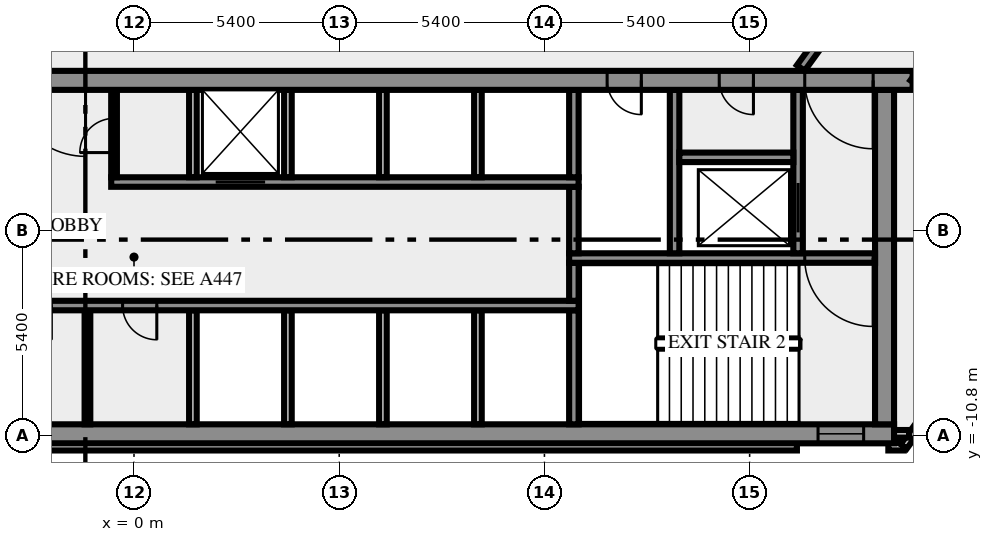
"""IFC4 building model, lengths in metres.
Left out: names, types, materials, properties, quantities, classifications, styles, units other than length and angle.
Written with IfcOpenShell. Run it as: python <this file> out.ifc"""

import sys

from ifc_helpers import new_model, si_unit, direction, frame, frame_2d, origin, place, context, subcontext, project, spatial, rectangle, extrude, element, fill, save


model = new_model("IFC4")
c1 = context("Model", 3, precision=1e-05, world=origin(), true_north=direction((0.0, 1.0)))
c2 = subcontext(c1, "Body", "Model", "MODEL_VIEW")
j1 = project(units=[si_unit("LENGTHUNIT", "METRE"), si_unit("PLANEANGLEUNIT", "RADIAN")], contexts=[c1])
p1 = place(None, origin())
s1 = spatial("IfcSite", under=j1, at=p1, CompositionType="ELEMENT")
p2 = place(p1, origin())
s2 = spatial("IfcBuilding", under=s1, at=p2, CompositionType="ELEMENT")
p3 = place(p2, frame((0.0, 0.0, 11.5)))
s3 = spatial("IfcBuildingStorey", under=s2, at=p3, CompositionType="ELEMENT", Elevation=11.5)
p4 = place(p3, frame((-17.444, -11.088, 0.0), z_axis=(0.0, 0.0, 1.0), x_axis=(1.0, 0.0, 0.0)))
e1 = element("IfcWall", 1, at=p4, inside=s3, PredefinedType="SOLIDWALL", context=c2, shape_type="SweptSolid", body=[
    extrude(rectangle(XDim=34.888, YDim=0.2, at=frame_2d((17.444, 0.0))), origin(), (0.0, 0.0, 1.0), 4.1),
])
p5 = place(p3, frame((19.85, -11.088, 0.0), z_axis=(0.0, 0.0, 1.0), x_axis=(1.0, 0.0, 0.0)))
e2 = element("IfcWall", 2, at=p5, inside=s3, PredefinedType="SOLIDWALL", context=c2, shape_type="SweptSolid", body=[
    extrude(rectangle(XDim=0.406, YDim=0.2, at=frame_2d((0.203, 0.0))), origin(), (0.0, 0.0, 1.0), 4.1),
])
p6 = place(p3, frame((20.253, -11.083, 0.0), z_axis=(0.0, 0.0, 1.0), x_axis=(0.587766567315, 0.809030569476, 0.0)))
e3 = element("IfcWall", 3, at=p6, inside=s3, PredefinedType="SOLIDWALL", context=c2, shape_type="SweptSolid", body=[
    extrude(rectangle(XDim=2.688, YDim=0.2, at=frame_2d((1.344, 0.0))), origin(), (0.0, 0.0, 1.0), 4.1),
])
p7 = place(p3, frame((19.98, -10.75, 0.0), z_axis=(0.0, 0.0, 1.0), x_axis=(1.0, 0.0, 0.0)))
e4 = element("IfcWall", 4, at=p7, inside=s3, PredefinedType="SOLIDWALL", context=c2, shape_type="SweptSolid", body=[
    extrude(rectangle(XDim=0.417, YDim=0.2, at=frame_2d((0.208, 0.0))), origin(), (0.0, 0.0, 1.0), 4.1),
])
p8 = place(p3, frame((-20.0, -10.75, 0.0), z_axis=(0.0, 0.0, 1.0), x_axis=(1.0, 0.0, 0.0)))
e5 = element("IfcWall", 5, at=p8, inside=s3, PredefinedType="SHEAR", context=c2, shape_type="SweptSolid", body=[
    extrude(rectangle(XDim=40.0, YDim=0.5, at=frame_2d((20.0, 0.0))), origin(), (0.0, 0.0, 1.0), 4.1),
])
p9 = place(p8, frame((0.8, 0.0, 1.0)))
e6 = element("IfcOpeningElement", 6, at=p9, cuts=e5, PredefinedType="OPENING", context=c2, shape_type="SweptSolid", body=[
    extrude(rectangle(XDim=1.2, YDim=1.2, at=frame_2d((0.6, 0.6))), frame((0.0, 0.26, 0.0), z_axis=(0.0, -1.0, 0.0), x_axis=(1.0, 0.0, 0.0)), (0.0, 0.0, 1.0), 0.52),
])
p10 = place(p8, frame((38.0, 0.0, 1.0)))
e7 = element("IfcOpeningElement", 7, at=p10, cuts=e5, PredefinedType="OPENING", context=c2, shape_type="SweptSolid", body=[
    extrude(rectangle(XDim=1.2, YDim=1.2, at=frame_2d((0.6, 0.6))), frame((0.0, 0.26, 0.0), z_axis=(0.0, -1.0, 0.0), x_axis=(1.0, 0.0, 0.0)), (0.0, 0.0, 1.0), 0.52),
])
p11 = place(p3, frame((-1.225, -10.5, 0.0), z_axis=(0.0, 0.0, 1.0), x_axis=(0.0, 1.0, 0.0)))
e8 = element("IfcWall", 8, at=p11, inside=s3, PredefinedType="PARTITIONING", context=c2, shape_type="SweptSolid", body=[
    extrude(rectangle(XDim=3.0, YDim=0.15, at=frame_2d((1.5, 0.0))), origin(), (0.0, 0.0, 1.0), 4.1),
])
for number, where, z_axis, x_axis in (
    (9, (1.55, -10.5, 0.0), (0.0, 0.0, 1.0), (0.0, 1.0, 0.0)),
    (10, (4.05, -10.5, 0.0), (0.0, 0.0, 1.0), (0.0, 1.0, 0.0)),
    (11, (6.55, -10.5, 0.0), (0.0, 0.0, 1.0), (0.0, 1.0, 0.0)),
    (12, (9.05, -10.5, 0.0), (0.0, 0.0, 1.0), (0.0, 1.0, 0.0)),
):
    element("IfcWall", number, at=place(p3, frame(where, z_axis=z_axis, x_axis=x_axis)), inside=s3, PredefinedType="SOLIDWALL", context=c2, shape_type="SweptSolid", body=[
        extrude(rectangle(XDim=3.0, YDim=0.2, at=frame_2d((1.5, 0.0))), origin(), (0.0, 0.0, 1.0), 4.1),
    ])
p12 = place(p3, frame((11.575, -10.5, 0.0), z_axis=(0.0, 0.0, 1.0), x_axis=(0.0, 1.0, 0.0)))
e13 = element("IfcWall", 13, at=p12, inside=s3, PredefinedType="SHEAR", context=c2, shape_type="SweptSolid", body=[
    extrude(rectangle(XDim=3.0, YDim=0.25, at=frame_2d((1.5, 0.0))), origin(), (0.0, 0.0, 1.0), 4.1),
])
p13 = place(p3, frame((19.75, -10.5, 0.0), z_axis=(0.0, 0.0, 1.0), x_axis=(0.0, 1.0, 0.0)))
e14 = element("IfcWall", 14, at=p13, inside=s3, PredefinedType="SHEAR", context=c2, shape_type="SweptSolid", body=[
    extrude(rectangle(XDim=8.8, YDim=0.5, at=frame_2d((4.4, 0.0))), origin(), (0.0, 0.0, 1.0), 4.1),
])
p14 = place(p3, frame((11.7, -7.375, 0.0), z_axis=(0.0, 0.0, 1.0), x_axis=(-1.0, 0.0, 0.0)))
e15 = element("IfcWall", 15, at=p14, inside=s3, PredefinedType="SHEAR", context=c2, shape_type="SweptSolid", body=[
    extrude(rectangle(XDim=23.4, YDim=0.25, at=frame_2d((11.7, 0.0))), origin(), (0.0, 0.0, 1.0), 4.1),
])
p15 = place(p14, frame((21.45, 0.0, 0.0)))
e16 = element("IfcOpeningElement", 16, at=p15, cuts=e15, PredefinedType="OPENING", context=c2, shape_type="SweptSolid", body=[
    extrude(rectangle(XDim=1.1, YDim=2.1, at=frame_2d((0.55, 1.05))), frame((0.0, 0.135, 0.0), z_axis=(0.0, -1.0, 0.0), x_axis=(1.0, 0.0, 0.0)), (0.0, 0.0, 1.0), 0.27),
])
p16 = place(p14, frame((18.95, 0.0, 0.0)))
e17 = element("IfcOpeningElement", 17, at=p16, cuts=e15, PredefinedType="OPENING", context=c2, shape_type="SweptSolid", body=[
    extrude(rectangle(XDim=1.1, YDim=2.1, at=frame_2d((0.55, 1.05))), frame((0.0, 0.135, 0.0), z_axis=(0.0, -1.0, 0.0), x_axis=(1.0, 0.0, 0.0)), (0.0, 0.0, 1.0), 0.27),
])
p17 = place(p14, frame((16.45, 0.0, 0.0)))
e18 = element("IfcOpeningElement", 18, at=p17, cuts=e15, PredefinedType="OPENING", context=c2, shape_type="SweptSolid", body=[
    extrude(rectangle(XDim=1.1, YDim=2.1, at=frame_2d((0.55, 1.05))), frame((0.0, 0.135, 0.0), z_axis=(0.0, -1.0, 0.0), x_axis=(1.0, 0.0, 0.0)), (0.0, 0.0, 1.0), 0.27),
])
p18 = place(p14, frame((13.875, 0.0, 0.0)))
e19 = element("IfcOpeningElement", 19, at=p18, cuts=e15, PredefinedType="OPENING", context=c2, shape_type="SweptSolid", body=[
    extrude(rectangle(XDim=0.9, YDim=2.1, at=frame_2d((0.45, 1.05))), frame((0.0, 0.135, 0.0), z_axis=(0.0, -1.0, 0.0), x_axis=(1.0, 0.0, 0.0)), (0.0, 0.0, 1.0), 0.27),
])
p19 = place(p14, frame((11.1, 0.0, 0.0)))
e20 = element("IfcOpeningElement", 20, at=p19, cuts=e15, PredefinedType="OPENING", context=c2, shape_type="SweptSolid", body=[
    extrude(rectangle(XDim=0.9, YDim=2.1, at=frame_2d((0.45, 1.05))), frame((0.0, 0.135, 0.0), z_axis=(0.0, -1.0, 0.0), x_axis=(1.0, 0.0, 0.0)), (0.0, 0.0, 1.0), 0.27),
])
p20 = place(p3, frame((11.575, -7.25, 0.0), z_axis=(0.0, 0.0, 1.0), x_axis=(0.0, 1.0, 0.0)))
e21 = element("IfcWall", 21, at=p20, inside=s3, PredefinedType="SHEAR", context=c2, shape_type="SweptSolid", body=[
    extrude(rectangle(XDim=1.0, YDim=0.25, at=frame_2d((0.5, 0.0))), origin(), (0.0, 0.0, 1.0), 4.1),
])
p21 = place(p3, frame((19.5, -6.125, 0.0), z_axis=(0.0, 0.0, 1.0), x_axis=(-1.0, 0.0, 0.0)))
e22 = element("IfcWall", 22, at=p21, inside=s3, PredefinedType="SHEAR", context=c2, shape_type="SweptSolid", body=[
    extrude(rectangle(XDim=8.05, YDim=0.25, at=frame_2d((4.025, 0.0))), origin(), (0.0, 0.0, 1.0), 4.1),
])
p22 = place(p21, frame((0.05, 0.0, 0.0)))
e23 = element("IfcOpeningElement", 23, at=p22, cuts=e22, PredefinedType="OPENING", context=c2, shape_type="SweptSolid", body=[
    extrude(rectangle(XDim=1.8, YDim=2.1, at=frame_2d((0.9, 1.05))), frame((0.0, 0.135, 0.0), z_axis=(0.0, -1.0, 0.0), x_axis=(1.0, 0.0, 0.0)), (0.0, 0.0, 1.0), 0.27),
])
p23 = place(p3, frame((11.575, -6.0, 0.0), z_axis=(0.0, 0.0, 1.0), x_axis=(0.0, 1.0, 0.0)))
e24 = element("IfcWall", 24, at=p23, inside=s3, PredefinedType="SHEAR", context=c2, shape_type="SweptSolid", body=[
    extrude(rectangle(XDim=1.75, YDim=0.25, at=frame_2d((0.875, 0.0))), origin(), (0.0, 0.0, 1.0), 4.1),
])
p24 = place(p3, frame((14.225, -6.0, 0.0), z_axis=(0.0, 0.0, 1.0), x_axis=(0.0, 1.0, 0.0)))
e25 = element("IfcWall", 25, at=p24, inside=s3, PredefinedType="SHEAR", context=c2, shape_type="SweptSolid", body=[
    extrude(rectangle(XDim=4.3, YDim=0.25, at=frame_2d((2.15, 0.0))), origin(), (0.0, 0.0, 1.0), 4.1),
])
p25 = place(p3, frame((17.475, -6.0, 0.0), z_axis=(0.0, 0.0, 1.0), x_axis=(0.0, 1.0, 0.0)))
e26 = element("IfcWall", 26, at=p25, inside=s3, PredefinedType="SHEAR", context=c2, shape_type="SweptSolid", body=[
    extrude(rectangle(XDim=4.3, YDim=0.25, at=frame_2d((2.15, 0.0))), origin(), (0.0, 0.0, 1.0), 4.1),
])
p26 = place(p25, frame((0.55, 0.0, 0.0)))
e27 = element("IfcOpeningElement", 27, at=p26, cuts=e26, PredefinedType="OPENING", context=c2, shape_type="SweptSolid", body=[
    extrude(rectangle(XDim=1.3, YDim=2.1, at=frame_2d((0.65, 1.05))), frame((0.0, 0.135, 0.0), z_axis=(0.0, -1.0, 0.0), x_axis=(1.0, 0.0, 0.0)), (0.0, 0.0, 1.0), 0.27),
])
p27 = place(p3, frame((-0.6, -4.125, 0.0), z_axis=(0.0, 0.0, 1.0), x_axis=(1.0, 0.0, 0.0)))
e28 = element("IfcWall", 28, at=p27, inside=s3, PredefinedType="SHEAR", context=c2, shape_type="SweptSolid", body=[
    extrude(rectangle(XDim=12.3, YDim=0.25, at=frame_2d((6.15, 0.0))), origin(), (0.0, 0.0, 1.0), 4.1),
])
p28 = place(p27, frame((2.75, 0.0, 0.0)))
e29 = element("IfcOpeningElement", 29, at=p28, cuts=e28, PredefinedType="OPENING", context=c2, shape_type="SweptSolid", body=[
    extrude(rectangle(XDim=1.3, YDim=2.1, at=frame_2d((0.65, 1.05))), frame((0.0, 0.135, 0.0), z_axis=(0.0, -1.0, 0.0), x_axis=(1.0, 0.0, 0.0)), (0.0, 0.0, 1.0), 0.27),
])
p29 = place(p3, frame((-0.525, -4.0, 0.0), z_axis=(0.0, 0.0, 1.0), x_axis=(0.0, 1.0, 0.0)))
e30 = element("IfcWall", 30, at=p29, inside=s3, PredefinedType="PARTITIONING", context=c2, shape_type="SweptSolid", body=[
    extrude(rectangle(XDim=2.3, YDim=0.15, at=frame_2d((1.15, 0.0))), origin(), (0.0, 0.0, 1.0), 4.1),
])
p30 = place(p29, frame((0.65, 0.0, 0.0)))
e31 = element("IfcOpeningElement", 31, at=p30, cuts=e30, PredefinedType="OPENING", context=c2, shape_type="SweptSolid", body=[
    extrude(rectangle(XDim=0.9, YDim=2.1, at=frame_2d((0.45, 1.05))), frame((0.0, 0.085, 0.0), z_axis=(0.0, -1.0, 0.0), x_axis=(1.0, 0.0, 0.0)), (0.0, 0.0, 1.0), 0.17),
])
for number, where, z_axis, x_axis in (
    (32, (1.55, -4.0, 0.0), (0.0, 0.0, 1.0), (0.0, 1.0, 0.0)),
    (33, (4.05, -4.0, 0.0), (0.0, 0.0, 1.0), (0.0, 1.0, 0.0)),
    (34, (6.55, -4.0, 0.0), (0.0, 0.0, 1.0), (0.0, 1.0, 0.0)),
    (35, (9.05, -4.0, 0.0), (0.0, 0.0, 1.0), (0.0, 1.0, 0.0)),
):
    element("IfcWall", number, at=place(p3, frame(where, z_axis=z_axis, x_axis=x_axis)), inside=s3, PredefinedType="SOLIDWALL", context=c2, shape_type="SweptSolid", body=[
        extrude(rectangle(XDim=2.3, YDim=0.2, at=frame_2d((1.15, 0.0))), origin(), (0.0, 0.0, 1.0), 4.1),
    ])
p31 = place(p3, frame((11.575, -4.0, 0.0), z_axis=(0.0, 0.0, 1.0), x_axis=(0.0, 1.0, 0.0)))
e36 = element("IfcWall", 36, at=p31, inside=s3, PredefinedType="SHEAR", context=c2, shape_type="SweptSolid", body=[
    extrude(rectangle(XDim=2.3, YDim=0.25, at=frame_2d((1.15, 0.0))), origin(), (0.0, 0.0, 1.0), 4.1),
])
p32 = place(p3, frame((14.35, -3.475, 0.0), z_axis=(0.0, 0.0, 1.0), x_axis=(1.0, 0.0, 0.0)))
e37 = element("IfcWall", 37, at=p32, inside=s3, PredefinedType="SHEAR", context=c2, shape_type="SweptSolid", body=[
    extrude(rectangle(XDim=3.0, YDim=0.25, at=frame_2d((1.5, 0.0))), origin(), (0.0, 0.0, 1.0), 4.1),
])
p33 = place(p3, frame((20.49, -1.45, 0.0), z_axis=(0.0, 0.0, 1.0), x_axis=(-1.0, 0.0, 0.0)))
e38 = element("IfcWall", 38, at=p33, inside=s3, PredefinedType="SHEAR", context=c2, shape_type="SweptSolid", body=[
    extrude(rectangle(XDim=40.98, YDim=0.5, at=frame_2d((20.49, 0.0))), origin(), (0.0, 0.0, 1.0), 4.1),
])
p34 = place(p33, frame((38.14, 0.0, 0.0)))
e39 = element("IfcOpeningElement", 39, at=p34, cuts=e38, PredefinedType="OPENING", context=c2, shape_type="SweptSolid", body=[
    extrude(rectangle(XDim=1.8, YDim=2.1, at=frame_2d((0.9, 1.05))), frame((0.0, 0.26, 0.0), z_axis=(0.0, -1.0, 0.0), x_axis=(1.0, 0.0, 0.0)), (0.0, 0.0, 1.0), 0.52),
])
p35 = place(p33, frame((36.728, 0.0, 0.0)))
e40 = element("IfcOpeningElement", 40, at=p35, cuts=e38, PredefinedType="OPENING", context=c2, shape_type="SweptSolid", body=[
    extrude(rectangle(XDim=0.8, YDim=2.1, at=frame_2d((0.4, 1.05))), frame((0.0, 0.26, 0.0), z_axis=(0.0, -1.0, 0.0), x_axis=(1.0, 0.0, 0.0)), (0.0, 0.0, 1.0), 0.52),
])
p36 = place(p33, frame((35.153, 0.0, 0.0)))
e41 = element("IfcOpeningElement", 41, at=p36, cuts=e38, PredefinedType="OPENING", context=c2, shape_type="SweptSolid", body=[
    extrude(rectangle(XDim=0.8, YDim=2.1, at=frame_2d((0.4, 1.05))), frame((0.0, 0.26, 0.0), z_axis=(0.0, -1.0, 0.0), x_axis=(1.0, 0.0, 0.0)), (0.0, 0.0, 1.0), 0.52),
])
p37 = place(p33, frame((32.94, 0.0, 0.0)))
e42 = element("IfcOpeningElement", 42, at=p37, cuts=e38, PredefinedType="OPENING", context=c2, shape_type="SweptSolid", body=[
    extrude(rectangle(XDim=0.9, YDim=2.1, at=frame_2d((0.45, 1.05))), frame((0.0, 0.26, 0.0), z_axis=(0.0, -1.0, 0.0), x_axis=(1.0, 0.0, 0.0)), (0.0, 0.0, 1.0), 0.52),
])
p38 = place(p33, frame((21.765, 0.0, 0.0)))
e43 = element("IfcOpeningElement", 43, at=p38, cuts=e38, PredefinedType="OPENING", context=c2, shape_type="SweptSolid", body=[
    extrude(rectangle(XDim=2.0, YDim=2.1, at=frame_2d((1.0, 1.05))), frame((0.0, 0.26, 0.0), z_axis=(0.0, -1.0, 0.0), x_axis=(1.0, 0.0, 0.0)), (0.0, 0.0, 1.0), 0.52),
])
p39 = place(p33, frame((7.14, 0.0, 0.0)))
e44 = element("IfcOpeningElement", 44, at=p39, cuts=e38, PredefinedType="OPENING", context=c2, shape_type="SweptSolid", body=[
    extrude(rectangle(XDim=0.9, YDim=2.1, at=frame_2d((0.45, 1.05))), frame((0.0, 0.26, 0.0), z_axis=(0.0, -1.0, 0.0), x_axis=(1.0, 0.0, 0.0)), (0.0, 0.0, 1.0), 0.52),
])
p40 = place(p33, frame((4.19, 0.0, 0.0)))
e45 = element("IfcOpeningElement", 45, at=p40, cuts=e38, PredefinedType="OPENING", context=c2, shape_type="SweptSolid", body=[
    extrude(rectangle(XDim=0.9, YDim=2.1, at=frame_2d((0.45, 1.05))), frame((0.0, 0.26, 0.0), z_axis=(0.0, -1.0, 0.0), x_axis=(1.0, 0.0, 0.0)), (0.0, 0.0, 1.0), 0.52),
])
p41 = place(p33, frame((1.04, 0.0, 0.0)))
e46 = element("IfcOpeningElement", 46, at=p41, cuts=e38, PredefinedType="OPENING", context=c2, shape_type="SweptSolid", body=[
    extrude(rectangle(XDim=1.8, YDim=2.1, at=frame_2d((0.9, 1.05))), frame((0.0, 0.26, 0.0), z_axis=(0.0, -1.0, 0.0), x_axis=(1.0, 0.0, 0.0)), (0.0, 0.0, 1.0), 0.52),
])
p42 = place(p3, frame((49.869, 38.856, 0.0), z_axis=(0.0, 0.0, 1.0), x_axis=(-0.587784522481, -0.809017524614, 0.0)))
e47 = element("IfcWall", 47, at=p42, inside=s3, PredefinedType="SOLIDWALL", context=c2, shape_type="SweptSolid", body=[
    extrude(rectangle(XDim=49.912, YDim=0.25, at=frame_2d((24.956, 0.0))), origin(), (0.0, 0.0, 1.0), 4.1),
])
p43 = place(p42, frame((23.897, 0.0, 0.0)))
e48 = element("IfcOpeningElement", 48, at=p43, cuts=e47, PredefinedType="OPENING", context=c2, shape_type="SweptSolid", body=[
    extrude(rectangle(XDim=0.9, YDim=2.1, at=frame_2d((0.45, 1.05))), frame((0.0, 0.135, 0.0), z_axis=(0.0, -1.0, 0.0), x_axis=(1.0, 0.0, 0.0)), (0.0, 0.0, 1.0), 0.27),
])
p44 = place(p42, frame((14.196, 0.0, 0.0)))
e49 = element("IfcOpeningElement", 49, at=p44, cuts=e47, PredefinedType="OPENING", context=c2, shape_type="SweptSolid", body=[
    extrude(rectangle(XDim=0.9, YDim=2.1, at=frame_2d((0.45, 1.05))), frame((0.0, 0.135, 0.0), z_axis=(0.0, -1.0, 0.0), x_axis=(1.0, 0.0, 0.0)), (0.0, 0.0, 1.0), 0.27),
])
p45 = place(p42, frame((39.847, 0.0, 0.0)))
e50 = element("IfcOpeningElement", 50, at=p45, cuts=e47, PredefinedType="OPENING", context=c2, shape_type="SweptSolid", body=[
    extrude(rectangle(XDim=0.9, YDim=2.1, at=frame_2d((0.45, 1.05))), frame((0.0, 0.135, 0.0), z_axis=(0.0, -1.0, 0.0), x_axis=(1.0, 0.0, 0.0)), (0.0, 0.0, 1.0), 0.27),
])
p46 = place(p42, frame((41.446, 0.0, 0.0)))
e51 = element("IfcOpeningElement", 51, at=p46, cuts=e47, PredefinedType="OPENING", context=c2, shape_type="SweptSolid", body=[
    extrude(rectangle(XDim=0.9, YDim=2.1, at=frame_2d((0.45, 1.05))), frame((0.0, 0.135, 0.0), z_axis=(0.0, -1.0, 0.0), x_axis=(1.0, 0.0, 0.0)), (0.0, 0.0, 1.0), 0.27),
])
p47 = place(p42, frame((31.997, 0.0, 0.0)))
e52 = element("IfcOpeningElement", 52, at=p47, cuts=e47, PredefinedType="OPENING", context=c2, shape_type="SweptSolid", body=[
    extrude(rectangle(XDim=0.9, YDim=2.1, at=frame_2d((0.45, 1.05))), frame((0.0, 0.135, 0.0), z_axis=(0.0, -1.0, 0.0), x_axis=(1.0, 0.0, 0.0)), (0.0, 0.0, 1.0), 0.27),
])
p48 = place(p42, frame((22.296, 0.0, 0.0)))
e53 = element("IfcOpeningElement", 53, at=p48, cuts=e47, PredefinedType="OPENING", context=c2, shape_type="SweptSolid", body=[
    extrude(rectangle(XDim=0.9, YDim=2.1, at=frame_2d((0.45, 1.05))), frame((0.0, 0.135, 0.0), z_axis=(0.0, -1.0, 0.0), x_axis=(1.0, 0.0, 0.0)), (0.0, 0.0, 1.0), 0.27),
])
p49 = place(p3, frame((17.545, -1.125, 0.0), z_axis=(0.0, 0.0, 1.0), x_axis=(0.587786323093, 0.809016216391, 0.0)))
e54 = element("IfcWall", 54, at=p49, inside=s3, PredefinedType="SOLIDWALL", context=c2, shape_type="SweptSolid", body=[
    extrude(rectangle(XDim=33.493, YDim=0.25, at=frame_2d((16.747, 0.0))), origin(), (0.0, 0.0, 1.0), 4.1),
])
p50 = place(p49, frame((3.441, 0.0, 0.0)))
e55 = element("IfcOpeningElement", 55, at=p50, cuts=e54, PredefinedType="OPENING", context=c2, shape_type="SweptSolid", body=[
    extrude(rectangle(XDim=0.9, YDim=2.1, at=frame_2d((0.45, 1.05))), frame((0.0, 0.135, 0.0), z_axis=(0.0, -1.0, 0.0), x_axis=(1.0, 0.0, 0.0)), (0.0, 0.0, 1.0), 0.27),
])
p51 = place(p49, frame((26.58, 0.0, 0.0)))
e56 = element("IfcOpeningElement", 56, at=p51, cuts=e54, PredefinedType="OPENING", context=c2, shape_type="SweptSolid", body=[
    extrude(rectangle(XDim=1.8, YDim=2.1, at=frame_2d((0.9, 1.05))), frame((0.0, 0.135, 0.0), z_axis=(0.0, -1.0, 0.0), x_axis=(1.0, 0.0, 0.0)), (0.0, 0.0, 1.0), 0.27),
])
p52 = place(p10, origin())
e57 = element("IfcWindow", 57, at=p52, inside=s3, PartitioningType="SINGLE_PANEL", PredefinedType="WINDOW", context=c2, shape_type="SweptSolid", body=[
    extrude(rectangle(XDim=1.2, YDim=1.2, at=frame_2d((0.6, 0.6))), frame((0.0, 0.03, 0.0), z_axis=(0.0, -1.0, 0.0), x_axis=(1.0, 0.0, 0.0)), (0.0, 0.0, 1.0), 0.06),
])
fill(e7, e57)
p53 = place(p19, origin())
e58 = element("IfcDoor", 58, at=p53, inside=s3, OperationType="SINGLE_SWING_LEFT", PredefinedType="DOOR", context=c2, shape_type="SweptSolid", body=[
    extrude(rectangle(XDim=0.9, YDim=2.1, at=frame_2d((0.45, 1.05))), frame((0.0, 0.025, 0.0), z_axis=(0.0, -1.0, 0.0), x_axis=(1.0, 0.0, 0.0)), (0.0, 0.0, 1.0), 0.05),
])
fill(e20, e58)
p54 = place(p22, origin())
e59 = element("IfcDoor", 59, at=p54, inside=s3, OperationType="DOUBLE_DOOR_SINGLE_SWING", PredefinedType="DOOR", context=c2, shape_type="SweptSolid", body=[
    extrude(rectangle(XDim=1.8, YDim=2.1, at=frame_2d((0.9, 1.05))), frame((0.0, 0.025, 0.0), z_axis=(0.0, -1.0, 0.0), x_axis=(1.0, 0.0, 0.0)), (0.0, 0.0, 1.0), 0.05),
])
fill(e23, e59)
p55 = place(p26, origin())
e60 = element("IfcDoor", 60, at=p55, inside=s3, OperationType="DOUBLE_DOOR_SLIDING", PredefinedType="DOOR", context=c2, shape_type="SweptSolid", body=[
    extrude(rectangle(XDim=1.3, YDim=2.1, at=frame_2d((0.65, 1.05))), frame((0.0, 0.025, 0.0), z_axis=(0.0, -1.0, 0.0), x_axis=(1.0, 0.0, 0.0)), (0.0, 0.0, 1.0), 0.05),
])
fill(e27, e60)
p56 = place(p28, origin())
e61 = element("IfcDoor", 61, at=p56, inside=s3, OperationType="DOUBLE_DOOR_SLIDING", PredefinedType="DOOR", context=c2, shape_type="SweptSolid", body=[
    extrude(rectangle(XDim=1.3, YDim=2.1, at=frame_2d((0.65, 1.05))), frame((0.0, 0.025, 0.0), z_axis=(0.0, -1.0, 0.0), x_axis=(1.0, 0.0, 0.0)), (0.0, 0.0, 1.0), 0.05),
])
fill(e29, e61)
p57 = place(p30, origin())
e62 = element("IfcDoor", 62, at=p57, inside=s3, OperationType="SINGLE_SWING_LEFT", PredefinedType="DOOR", context=c2, shape_type="SweptSolid", body=[
    extrude(rectangle(XDim=0.9, YDim=2.1, at=frame_2d((0.45, 1.05))), frame((0.0, 0.025, 0.0), z_axis=(0.0, -1.0, 0.0), x_axis=(1.0, 0.0, 0.0)), (0.0, 0.0, 1.0), 0.05),
])
fill(e31, e62)
p58 = place(p38, origin())
e63 = element("IfcDoor", 63, at=p58, inside=s3, OperationType="DOUBLE_DOOR_SINGLE_SWING", PredefinedType="DOOR", context=c2, shape_type="SweptSolid", body=[
    extrude(rectangle(XDim=2.0, YDim=2.1, at=frame_2d((1.0, 1.05))), frame((0.0, 0.025, 0.0), z_axis=(0.0, -1.0, 0.0), x_axis=(1.0, 0.0, 0.0)), (0.0, 0.0, 1.0), 0.05),
])
fill(e43, e63)
p59 = place(p39, origin())
e64 = element("IfcDoor", 64, at=p59, inside=s3, OperationType="SINGLE_SWING_LEFT", PredefinedType="DOOR", context=c2, shape_type="SweptSolid", body=[
    extrude(rectangle(XDim=0.9, YDim=2.1, at=frame_2d((0.45, 1.05))), frame((0.0, 0.025, 0.0), z_axis=(0.0, -1.0, 0.0), x_axis=(1.0, 0.0, 0.0)), (0.0, 0.0, 1.0), 0.05),
])
fill(e44, e64)
p60 = place(p40, origin())
e65 = element("IfcDoor", 65, at=p60, inside=s3, OperationType="SINGLE_SWING_LEFT", PredefinedType="DOOR", context=c2, shape_type="SweptSolid", body=[
    extrude(rectangle(XDim=0.9, YDim=2.1, at=frame_2d((0.45, 1.05))), frame((0.0, 0.025, 0.0), z_axis=(0.0, -1.0, 0.0), x_axis=(1.0, 0.0, 0.0)), (0.0, 0.0, 1.0), 0.05),
])
fill(e45, e65)
p61 = place(p41, origin())
e66 = element("IfcDoor", 66, at=p61, inside=s3, OperationType="DOUBLE_DOOR_SINGLE_SWING", PredefinedType="DOOR", context=c2, shape_type="SweptSolid", body=[
    extrude(rectangle(XDim=1.8, YDim=2.1, at=frame_2d((0.9, 1.05))), frame((0.0, 0.025, 0.0), z_axis=(0.0, -1.0, 0.0), x_axis=(1.0, 0.0, 0.0)), (0.0, 0.0, 1.0), 0.05),
])
fill(e46, e66)
save(model, sys.argv[1])
